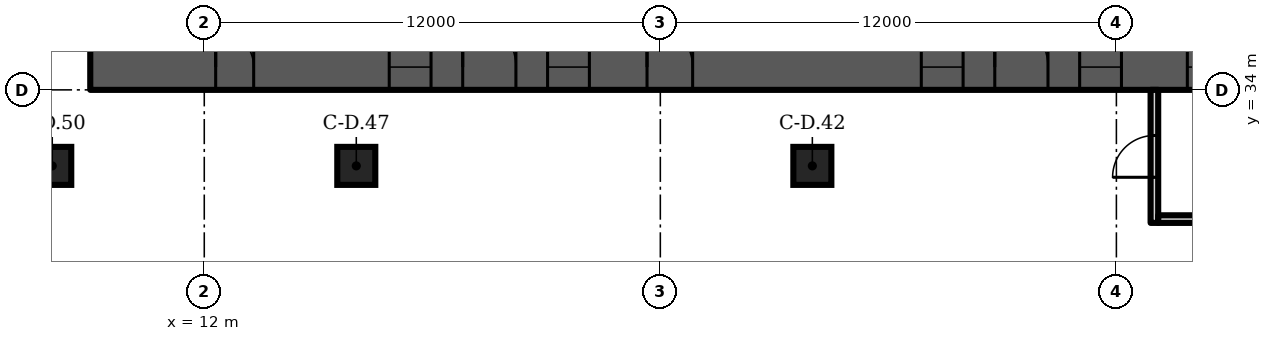
"""IFC4 building model, lengths in metres.
Left out: names, types, materials, properties, quantities, classifications, styles, units other than length and angle.
Written with IfcOpenShell. Run it as: python <this file> out.ifc"""

import sys

from ifc_helpers import new_model, si_unit, direction, frame, frame_2d, origin, origin_2d, place, context, subcontext, project, spatial, rectangle, extrude, element, fill, save


model = new_model("IFC4")
c1 = context("Model", 3, precision=1e-05, world=origin(), true_north=direction((0.0, 1.0)))
c2 = subcontext(c1, "Body", "Model", "MODEL_VIEW")
j1 = project(units=[si_unit("LENGTHUNIT", "METRE"), si_unit("PLANEANGLEUNIT", "RADIAN")], contexts=[c1])
p1 = place(None, origin())
s1 = spatial("IfcSite", under=j1, at=p1, CompositionType="ELEMENT")
p2 = place(p1, origin())
s2 = spatial("IfcBuilding", under=s1, at=p2, CompositionType="ELEMENT")
p3 = place(p2, frame((0.0, 0.0, 27.5)))
s3 = spatial("IfcBuildingStorey", under=s2, at=p3, CompositionType="ELEMENT", Elevation=27.5)
for number, where, z_axis, x_axis in (
    (1, (28.0, 32.0, 0.0), (0.0, 0.0, 1.0), (1.0, 0.0, 0.0)),
    (2, (16.0, 32.0, 0.0), (0.0, 0.0, 1.0), (1.0, 0.0, 0.0)),
    (3, (8.0, 32.0, 0.0), (0.0, 0.0, 1.0), (1.0, 0.0, 0.0)),
):
    element("IfcColumn", number, at=place(p3, frame(where, z_axis=z_axis, x_axis=x_axis)), inside=s3, PredefinedType="COLUMN", context=c2, shape_type="SweptSolid", body=[
        extrude(rectangle(XDim=1.0, YDim=1.0, at=origin_2d()), origin(), (0.0, 0.0, 1.0), 5.5),
    ])
p4 = place(p3, frame((9.0, 34.6, 0.0), z_axis=(0.0, 0.0, 1.0), x_axis=(1.0, 0.0, 0.0)))
e4 = element("IfcWall", 4, at=p4, inside=s3, PredefinedType="SHEAR", context=c2, shape_type="SweptSolid", body=[
    extrude(rectangle(XDim=56.0, YDim=1.2, at=frame_2d((28.0, 0.0))), origin(), (0.0, 0.0, 1.0), 5.2),
])
p5 = place(p4, frame((3.3, 0.0, 0.0)))
e5 = element("IfcOpeningElement", 5, at=p5, cuts=e4, PredefinedType="OPENING", context=c2, shape_type="SweptSolid", body=[
    extrude(rectangle(XDim=1.0, YDim=2.1, at=frame_2d((0.5, 1.05))), frame((0.0, 0.61, 0.0), z_axis=(0.0, -1.0, 0.0), x_axis=(1.0, 0.0, 0.0)), (0.0, 0.0, 1.0), 1.22),
])
p6 = place(p4, frame((7.867, 0.0, 0.0)))
e6 = element("IfcOpeningElement", 6, at=p6, cuts=e4, PredefinedType="OPENING", context=c2, shape_type="SweptSolid", body=[
    extrude(rectangle(XDim=1.1, YDim=2.1, at=frame_2d((0.55, 1.05))), frame((0.0, 0.61, 0.0), z_axis=(0.0, -1.0, 0.0), x_axis=(1.0, 0.0, 0.0)), (0.0, 0.0, 1.0), 1.22),
])
p7 = place(p4, frame((12.033, 0.0, 0.0)))
e7 = element("IfcOpeningElement", 7, at=p7, cuts=e4, PredefinedType="OPENING", context=c2, shape_type="SweptSolid", body=[
    extrude(rectangle(XDim=1.1, YDim=2.1, at=frame_2d((0.55, 1.05))), frame((0.0, 0.61, 0.0), z_axis=(0.0, -1.0, 0.0), x_axis=(1.0, 0.0, 0.0)), (0.0, 0.0, 1.0), 1.22),
])
p8 = place(p4, frame((9.8, 0.0, 0.0)))
e8 = element("IfcOpeningElement", 8, at=p8, cuts=e4, PredefinedType="OPENING", context=c2, shape_type="SweptSolid", body=[
    extrude(rectangle(XDim=1.4, YDim=2.1, at=frame_2d((0.7, 1.05))), frame((0.0, 0.61, 0.0), z_axis=(0.0, -1.0, 0.0), x_axis=(1.0, 0.0, 0.0)), (0.0, 0.0, 1.0), 1.22),
])
p9 = place(p4, frame((14.65, 0.0, 0.0)))
e9 = element("IfcOpeningElement", 9, at=p9, cuts=e4, PredefinedType="OPENING", context=c2, shape_type="SweptSolid", body=[
    extrude(rectangle(XDim=1.2, YDim=2.1, at=frame_2d((0.6, 1.05))), frame((0.0, 0.61, 0.0), z_axis=(0.0, -1.0, 0.0), x_axis=(1.0, 0.0, 0.0)), (0.0, 0.0, 1.0), 1.22),
])
p10 = place(p4, frame((21.867, 0.0, 0.0)))
e10 = element("IfcOpeningElement", 10, at=p10, cuts=e4, PredefinedType="OPENING", context=c2, shape_type="SweptSolid", body=[
    extrude(rectangle(XDim=1.1, YDim=2.1, at=frame_2d((0.55, 1.05))), frame((0.0, 0.61, 0.0), z_axis=(0.0, -1.0, 0.0), x_axis=(1.0, 0.0, 0.0)), (0.0, 0.0, 1.0), 1.22),
])
p11 = place(p4, frame((26.033, 0.0, 0.0)))
e11 = element("IfcOpeningElement", 11, at=p11, cuts=e4, PredefinedType="OPENING", context=c2, shape_type="SweptSolid", body=[
    extrude(rectangle(XDim=1.1, YDim=2.1, at=frame_2d((0.55, 1.05))), frame((0.0, 0.61, 0.0), z_axis=(0.0, -1.0, 0.0), x_axis=(1.0, 0.0, 0.0)), (0.0, 0.0, 1.0), 1.22),
])
p12 = place(p4, frame((23.8, 0.0, 0.0)))
e12 = element("IfcOpeningElement", 12, at=p12, cuts=e4, PredefinedType="OPENING", context=c2, shape_type="SweptSolid", body=[
    extrude(rectangle(XDim=1.4, YDim=2.1, at=frame_2d((0.7, 1.05))), frame((0.0, 0.61, 0.0), z_axis=(0.0, -1.0, 0.0), x_axis=(1.0, 0.0, 0.0)), (0.0, 0.0, 1.0), 1.22),
])
p13 = place(p4, frame((28.867, 0.0, 0.0)))
e13 = element("IfcOpeningElement", 13, at=p13, cuts=e4, PredefinedType="OPENING", context=c2, shape_type="SweptSolid", body=[
    extrude(rectangle(XDim=1.1, YDim=2.1, at=frame_2d((0.55, 1.05))), frame((0.0, 0.61, 0.0), z_axis=(0.0, -1.0, 0.0), x_axis=(1.0, 0.0, 0.0)), (0.0, 0.0, 1.0), 1.22),
])
p14 = place(p4, frame((33.033, 0.0, 0.0)))
e14 = element("IfcOpeningElement", 14, at=p14, cuts=e4, PredefinedType="OPENING", context=c2, shape_type="SweptSolid", body=[
    extrude(rectangle(XDim=1.1, YDim=2.1, at=frame_2d((0.55, 1.05))), frame((0.0, 0.61, 0.0), z_axis=(0.0, -1.0, 0.0), x_axis=(1.0, 0.0, 0.0)), (0.0, 0.0, 1.0), 1.22),
])
p15 = place(p4, frame((40.15, 0.0, 0.0)))
e15 = element("IfcOpeningElement", 15, at=p15, cuts=e4, PredefinedType="OPENING", context=c2, shape_type="SweptSolid", body=[
    extrude(rectangle(XDim=1.2, YDim=2.1, at=frame_2d((0.6, 1.05))), frame((0.0, 0.61, 0.0), z_axis=(0.0, -1.0, 0.0), x_axis=(1.0, 0.0, 0.0)), (0.0, 0.0, 1.0), 1.22),
])
p16 = place(p4, frame((44.8, 0.0, 0.0)))
e16 = element("IfcOpeningElement", 16, at=p16, cuts=e4, PredefinedType="OPENING", context=c2, shape_type="SweptSolid", body=[
    extrude(rectangle(XDim=1.4, YDim=2.1, at=frame_2d((0.7, 1.05))), frame((0.0, 0.61, 0.0), z_axis=(0.0, -1.0, 0.0), x_axis=(1.0, 0.0, 0.0)), (0.0, 0.0, 1.0), 1.22),
])
p17 = place(p4, frame((49.867, 0.0, 0.0)))
e17 = element("IfcOpeningElement", 17, at=p17, cuts=e4, PredefinedType="OPENING", context=c2, shape_type="SweptSolid", body=[
    extrude(rectangle(XDim=1.1, YDim=2.1, at=frame_2d((0.55, 1.05))), frame((0.0, 0.61, 0.0), z_axis=(0.0, -1.0, 0.0), x_axis=(1.0, 0.0, 0.0)), (0.0, 0.0, 1.0), 1.22),
])
p18 = place(p4, frame((53.5, 0.0, 0.0)))
e18 = element("IfcOpeningElement", 18, at=p18, cuts=e4, PredefinedType="OPENING", context=c2, shape_type="SweptSolid", body=[
    extrude(rectangle(XDim=1.1, YDim=2.1, at=frame_2d((0.55, 1.05))), frame((0.0, 0.61, 0.0), z_axis=(0.0, -1.0, 0.0), x_axis=(1.0, 0.0, 0.0)), (0.0, 0.0, 1.0), 1.22),
])
p19 = place(p4, frame((51.567, 0.0, 0.0)))
e19 = element("IfcOpeningElement", 19, at=p19, cuts=e4, PredefinedType="OPENING", context=c2, shape_type="SweptSolid", body=[
    extrude(rectangle(XDim=1.4, YDim=2.1, at=frame_2d((0.7, 1.05))), frame((0.0, 0.61, 0.0), z_axis=(0.0, -1.0, 0.0), x_axis=(1.0, 0.0, 0.0)), (0.0, 0.0, 1.0), 1.22),
])
p20 = place(p3, frame((37.0, 30.5, 0.0), z_axis=(0.0, 0.0, 1.0), x_axis=(0.0, 1.0, 0.0)))
e20 = element("IfcWall", 20, at=p20, inside=s3, PredefinedType="PARTITIONING", context=c2, shape_type="SweptSolid", body=[
    extrude(rectangle(XDim=3.5, YDim=0.2, at=frame_2d((1.75, 0.0))), origin(), (0.0, 0.0, 1.0), 5.2),
])
p21 = place(p20, frame((1.2, 0.0, 0.0)))
e21 = element("IfcOpeningElement", 21, at=p21, cuts=e20, PredefinedType="OPENING", context=c2, shape_type="SweptSolid", body=[
    extrude(rectangle(XDim=1.1, YDim=2.1, at=frame_2d((0.55, 1.05))), frame((0.0, 0.11, 0.0), z_axis=(0.0, -1.0, 0.0), x_axis=(1.0, 0.0, 0.0)), (0.0, 0.0, 1.0), 0.22),
])
p22 = place(p3, frame((37.1, 30.6, 0.0), z_axis=(0.0, 0.0, 1.0), x_axis=(1.0, 0.0, 0.0)))
e22 = element("IfcWall", 22, at=p22, inside=s3, PredefinedType="PARTITIONING", context=c2, shape_type="SweptSolid", body=[
    extrude(rectangle(XDim=2.8, YDim=0.2, at=frame_2d((1.4, 0.0))), origin(), (0.0, 0.0, 1.0), 5.2),
])
p23 = place(p5, origin())
e23 = element("IfcDoor", 23, at=p23, inside=s3, OperationType="SINGLE_SWING_LEFT", PredefinedType="DOOR", context=c2, shape_type="SweptSolid", body=[
    extrude(rectangle(XDim=1.0, YDim=2.1, at=frame_2d((0.5, 1.05))), frame((0.0, 0.6, 0.0), z_axis=(0.0, -1.0, 0.0), x_axis=(1.0, 0.0, 0.0)), (0.0, 0.0, 1.0), 1.199),
])
fill(e5, e23)
p24 = place(p6, origin())
e24 = element("IfcDoor", 24, at=p24, inside=s3, OperationType="DOUBLE_DOOR_SLIDING", PredefinedType="DOOR", context=c2, shape_type="SweptSolid", body=[
    extrude(rectangle(XDim=1.1, YDim=2.1, at=frame_2d((0.55, 1.05))), frame((0.0, 0.025, 0.0), z_axis=(0.0, -1.0, 0.0), x_axis=(1.0, 0.0, 0.0)), (0.0, 0.0, 1.0), 0.05),
])
fill(e6, e24)
p25 = place(p7, origin())
e25 = element("IfcDoor", 25, at=p25, inside=s3, OperationType="DOUBLE_DOOR_SLIDING", PredefinedType="DOOR", context=c2, shape_type="SweptSolid", body=[
    extrude(rectangle(XDim=1.1, YDim=2.1, at=frame_2d((0.55, 1.05))), frame((0.0, 0.025, 0.0), z_axis=(0.0, -1.0, 0.0), x_axis=(1.0, 0.0, 0.0)), (0.0, 0.0, 1.0), 0.05),
])
fill(e7, e25)
p26 = place(p8, origin())
e26 = element("IfcDoor", 26, at=p26, inside=s3, OperationType="DOUBLE_DOOR_SINGLE_SWING", PredefinedType="DOOR", context=c2, shape_type="SweptSolid", body=[
    extrude(rectangle(XDim=1.4, YDim=2.1, at=frame_2d((0.7, 1.05))), frame((0.0, 0.025, 0.0), z_axis=(0.0, -1.0, 0.0), x_axis=(1.0, 0.0, 0.0)), (0.0, 0.0, 1.0), 0.05),
])
fill(e8, e26)
p27 = place(p9, origin())
e27 = element("IfcDoor", 27, at=p27, inside=s3, OperationType="SINGLE_SWING_LEFT", PredefinedType="DOOR", context=c2, shape_type="SweptSolid", body=[
    extrude(rectangle(XDim=1.2, YDim=2.1, at=frame_2d((0.6, 1.05))), frame((0.0, 0.025, 0.0), z_axis=(0.0, -1.0, 0.0), x_axis=(1.0, 0.0, 0.0)), (0.0, 0.0, 1.0), 0.05),
])
fill(e9, e27)
p28 = place(p10, origin())
e28 = element("IfcDoor", 28, at=p28, inside=s3, OperationType="DOUBLE_DOOR_SLIDING", PredefinedType="DOOR", context=c2, shape_type="SweptSolid", body=[
    extrude(rectangle(XDim=1.1, YDim=2.1, at=frame_2d((0.55, 1.05))), frame((0.0, 0.025, 0.0), z_axis=(0.0, -1.0, 0.0), x_axis=(1.0, 0.0, 0.0)), (0.0, 0.0, 1.0), 0.05),
])
fill(e10, e28)
p29 = place(p11, origin())
e29 = element("IfcDoor", 29, at=p29, inside=s3, OperationType="DOUBLE_DOOR_SLIDING", PredefinedType="DOOR", context=c2, shape_type="SweptSolid", body=[
    extrude(rectangle(XDim=1.1, YDim=2.1, at=frame_2d((0.55, 1.05))), frame((0.0, 0.025, 0.0), z_axis=(0.0, -1.0, 0.0), x_axis=(1.0, 0.0, 0.0)), (0.0, 0.0, 1.0), 0.05),
])
fill(e11, e29)
p30 = place(p12, origin())
e30 = element("IfcDoor", 30, at=p30, inside=s3, OperationType="DOUBLE_DOOR_SINGLE_SWING", PredefinedType="DOOR", context=c2, shape_type="SweptSolid", body=[
    extrude(rectangle(XDim=1.4, YDim=2.1, at=frame_2d((0.7, 1.05))), frame((0.0, 0.025, 0.0), z_axis=(0.0, -1.0, 0.0), x_axis=(1.0, 0.0, 0.0)), (0.0, 0.0, 1.0), 0.05),
])
fill(e12, e30)
p31 = place(p13, origin())
e31 = element("IfcDoor", 31, at=p31, inside=s3, OperationType="DOUBLE_DOOR_SLIDING", PredefinedType="DOOR", context=c2, shape_type="SweptSolid", body=[
    extrude(rectangle(XDim=1.1, YDim=2.1, at=frame_2d((0.55, 1.05))), frame((0.0, 0.025, 0.0), z_axis=(0.0, -1.0, 0.0), x_axis=(1.0, 0.0, 0.0)), (0.0, 0.0, 1.0), 0.05),
])
fill(e13, e31)
p32 = place(p21, origin())
e32 = element("IfcDoor", 32, at=p32, inside=s3, OperationType="SINGLE_SWING_LEFT", PredefinedType="DOOR", context=c2, shape_type="SweptSolid", body=[
    extrude(rectangle(XDim=1.1, YDim=2.1, at=frame_2d((0.55, 1.05))), frame((0.0, 0.025, 0.0), z_axis=(0.0, -1.0, 0.0), x_axis=(1.0, 0.0, 0.0)), (0.0, 0.0, 1.0), 0.05),
])
fill(e21, e32)
save(model, sys.argv[1])
